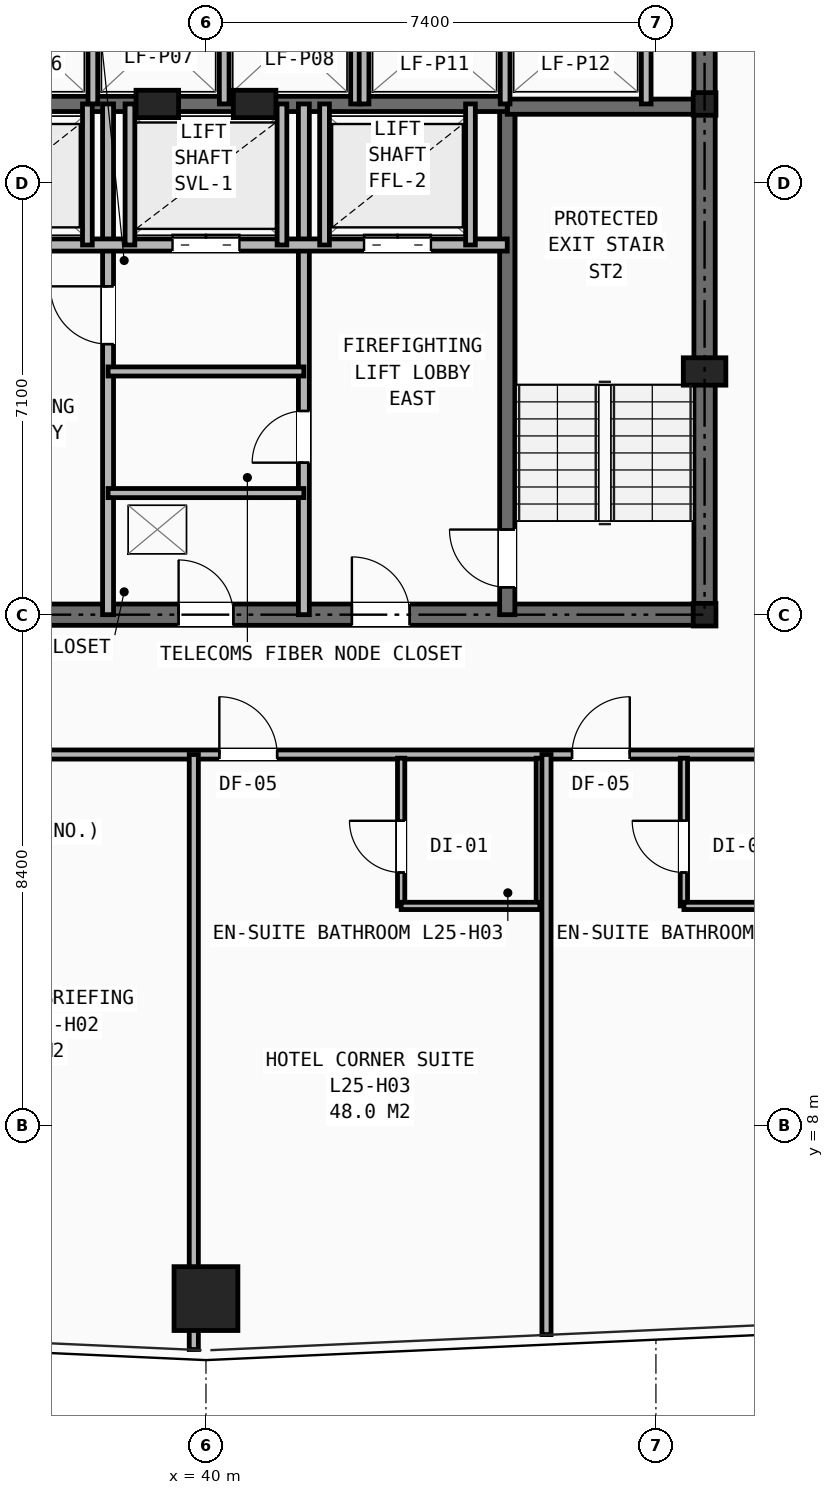
"""IFC4 building model, lengths in metres.
Left out: names, types, materials, properties, quantities, classifications, styles, units other than length and angle.
Written with IfcOpenShell. Run it as: python <this file> out.ifc"""

import sys

from ifc_helpers import new_model, si_unit, direction, frame, frame_2d, origin, origin_2d, place, context, subcontext, project, spatial, rectangle, hollow_rectangle, i_section, extrude, element, fill, save


model = new_model("IFC4")
c1 = context("Model", 3, precision=1e-05, world=origin(), true_north=direction((0.0, 1.0)))
c2 = subcontext(c1, "Body", "Model", "MODEL_VIEW")
j1 = project(units=[si_unit("LENGTHUNIT", "METRE"), si_unit("PLANEANGLEUNIT", "RADIAN")], contexts=[c1])
p1 = place(None, origin())
s1 = spatial("IfcSite", under=j1, at=p1, CompositionType="ELEMENT")
p2 = place(p1, origin())
s2 = spatial("IfcBuilding", under=s1, at=p2, CompositionType="ELEMENT")
p3 = place(p2, frame((0.0, 0.0, 89.4)))
s3 = spatial("IfcBuildingStorey", under=s2, at=p3, CompositionType="ELEMENT", Elevation=89.4)
for number, where, z_axis, x_axis in (
    (1, (48.2, 16.4, 0.0), (0.0, 0.0, 1.0), (1.0, 0.0, 0.0)),
    (2, (48.2, 24.8, 0.0), (0.0, 0.0, 1.0), (1.0, 0.0, 0.0)),
):
    element("IfcColumn", number, at=place(p3, frame(where, z_axis=z_axis, x_axis=x_axis)), inside=s3, PredefinedType="COLUMN", context=c2, shape_type="SweptSolid", body=[
        extrude(i_section(OverallWidth=0.374, OverallDepth=0.372, WebThickness=0.016, FlangeThickness=0.026, at=origin_2d()), origin(), (0.0, 0.0, 1.0), 3.2),
    ])
for number, where, z_axis, x_axis in (
    (3, (48.2, 20.4, 0.0), (0.0, 0.0, 1.0), (1.0, 0.0, 0.0)),
    (4, (39.2, 24.8, 0.0), (0.0, 0.0, 1.0), (1.0, 0.0, 0.0)),
    (5, (40.8, 24.8, 0.0), (0.0, 0.0, 1.0), (1.0, 0.0, 0.0)),
):
    element("IfcColumn", number, at=place(p3, frame(where, z_axis=z_axis, x_axis=x_axis)), inside=s3, PredefinedType="PILASTER", context=c2, shape_type="SweptSolid", body=[
        extrude(rectangle(XDim=0.7, YDim=0.45, at=origin_2d()), origin(), (0.0, 0.0, 1.0), 3.2),
    ])
p4 = place(p3, frame((40.0, 5.152, 0.0), z_axis=(0.0, 0.0, 1.0), x_axis=(1.0, 0.0, 0.0)))
e6 = element("IfcColumn", 6, at=p4, inside=s3, PredefinedType="COLUMN", context=c2, shape_type="SweptSolid", body=[
    extrude(hollow_rectangle(XDim=1.05, YDim=1.05, WallThickness=0.07, at=origin_2d()), origin(), (0.0, 0.0, 1.0), 3.2),
])
p5 = place(p3, frame((31.8, 16.4, 0.0), z_axis=(0.0, 0.0, 1.0), x_axis=(1.0, 0.0, 0.0)))
e7 = element("IfcWall", 7, at=p5, inside=s3, PredefinedType="SHEAR", context=c2, shape_type="SweptSolid", body=[
    extrude(rectangle(XDim=16.4, YDim=0.35, at=frame_2d((8.2, 0.0))), origin(), (0.0, 0.0, 1.0), 2.97),
])
p6 = place(p5, frame((7.75, 0.0, 0.0)))
e8 = element("IfcOpeningElement", 8, at=p6, cuts=e7, PredefinedType="OPENING", context=c2, shape_type="SweptSolid", body=[
    extrude(rectangle(XDim=0.9, YDim=2.1, at=frame_2d((0.45, 1.05))), frame((0.0, 0.185, 0.0), z_axis=(0.0, -1.0, 0.0), x_axis=(1.0, 0.0, 0.0)), (0.0, 0.0, 1.0), 0.37),
])
p7 = place(p5, frame((4.2, 0.0, 0.0)))
e9 = element("IfcOpeningElement", 9, at=p7, cuts=e7, PredefinedType="OPENING", context=c2, shape_type="SweptSolid", body=[
    extrude(rectangle(XDim=0.95, YDim=2.1, at=frame_2d((0.475, 1.05))), frame((0.0, 0.185, 0.0), z_axis=(0.0, -1.0, 0.0), x_axis=(1.0, 0.0, 0.0)), (0.0, 0.0, 1.0), 0.37),
])
p8 = place(p5, frame((10.6, 0.0, 0.0)))
e10 = element("IfcOpeningElement", 10, at=p8, cuts=e7, PredefinedType="OPENING", context=c2, shape_type="SweptSolid", body=[
    extrude(rectangle(XDim=0.95, YDim=2.1, at=frame_2d((0.475, 1.05))), frame((0.0, 0.185, 0.0), z_axis=(0.0, -1.0, 0.0), x_axis=(1.0, 0.0, 0.0)), (0.0, 0.0, 1.0), 0.37),
])
p9 = place(p3, frame((48.2, 16.4, 0.0), z_axis=(0.0, 0.0, 1.0), x_axis=(0.0, 1.0, 0.0)))
e11 = element("IfcWall", 11, at=p9, inside=s3, PredefinedType="SHEAR", context=c2, shape_type="SweptSolid", body=[
    extrude(rectangle(XDim=14.8, YDim=0.35, at=frame_2d((7.4, 0.0))), origin(), (0.0, 0.0, 1.0), 2.97),
])
p10 = place(p9, frame((11.0, 0.0, 0.0)))
e12 = element("IfcOpeningElement", 12, at=p10, cuts=e11, PredefinedType="OPENING", context=c2, shape_type="SweptSolid", body=[
    extrude(rectangle(XDim=1.1, YDim=2.15, at=frame_2d((0.55, 1.075))), frame((0.0, 0.185, 0.0), z_axis=(0.0, -1.0, 0.0), x_axis=(1.0, 0.0, 0.0)), (0.0, 0.0, 1.0), 0.37),
])
p11 = place(p3, frame((44.955, 16.4, 0.0), z_axis=(0.0, 0.0, 1.0), x_axis=(0.0, 1.0, 0.0)))
e13 = element("IfcWall", 13, at=p11, inside=s3, PredefinedType="SHEAR", context=c2, shape_type="SweptSolid", body=[
    extrude(rectangle(XDim=8.4, YDim=0.25, at=frame_2d((4.2, 0.0))), origin(), (0.0, 0.0, 1.0), 2.97),
])
p12 = place(p11, frame((0.45, 0.0, 0.0)))
e14 = element("IfcOpeningElement", 14, at=p12, cuts=e13, PredefinedType="OPENING", context=c2, shape_type="SweptSolid", body=[
    extrude(rectangle(XDim=0.95, YDim=2.1, at=frame_2d((0.475, 1.05))), frame((0.0, 0.135, 0.0), z_axis=(0.0, -1.0, 0.0), x_axis=(1.0, 0.0, 0.0)), (0.0, 0.0, 1.0), 0.27),
])
p13 = place(p3, frame((44.955, 24.755, 0.0), z_axis=(0.0, 0.0, 1.0), x_axis=(1.0, 0.0, 0.0)))
e15 = element("IfcWall", 15, at=p13, inside=s3, PredefinedType="SHEAR", context=c2, shape_type="SweptSolid", body=[
    extrude(rectangle(XDim=3.245, YDim=0.25, at=frame_2d((1.623, 0.0))), origin(), (0.0, 0.0, 1.0), 2.97),
])
p14 = place(p3, frame((35.045, 24.8, 0.0), z_axis=(0.0, 0.0, 1.0), x_axis=(1.0, 0.0, 0.0)))
e16 = element("IfcWall", 16, at=p14, inside=s3, PredefinedType="SHEAR", context=c2, shape_type="SweptSolid", body=[
    extrude(rectangle(XDim=9.91, YDim=0.25, at=frame_2d((4.955, 0.0))), origin(), (0.0, 0.0, 1.0), 2.97),
])
p15 = place(p3, frame((38.39, 16.4, 0.0), z_axis=(0.0, 0.0, 1.0), x_axis=(0.0, 1.0, 0.0)))
e17 = element("IfcWall", 17, at=p15, inside=s3, PredefinedType="PARTITIONING", context=c2, shape_type="SweptSolid", body=[
    extrude(rectangle(XDim=8.4, YDim=0.18, at=frame_2d((4.2, 0.0))), origin(), (0.0, 0.0, 1.0), 2.698),
])
p16 = place(p15, frame((4.45, 0.0, 0.0)))
e18 = element("IfcOpeningElement", 18, at=p16, cuts=e17, PredefinedType="OPENING", context=c2, shape_type="SweptSolid", body=[
    extrude(rectangle(XDim=0.95, YDim=2.1, at=frame_2d((0.475, 1.05))), frame((0.0, 0.1, 0.0), z_axis=(0.0, -1.0, 0.0), x_axis=(1.0, 0.0, 0.0)), (0.0, 0.0, 1.0), 0.2),
])
p17 = place(p3, frame((41.61, 16.4, 0.0), z_axis=(0.0, 0.0, 1.0), x_axis=(0.0, 1.0, 0.0)))
e19 = element("IfcWall", 19, at=p17, inside=s3, PredefinedType="PARTITIONING", context=c2, shape_type="SweptSolid", body=[
    extrude(rectangle(XDim=8.4, YDim=0.18, at=frame_2d((4.2, 0.0))), origin(), (0.0, 0.0, 1.0), 2.698),
])
p18 = place(p17, frame((2.5, 0.0, 0.0)))
e20 = element("IfcOpeningElement", 20, at=p18, cuts=e19, PredefinedType="OPENING", context=c2, shape_type="SweptSolid", body=[
    extrude(rectangle(XDim=0.85, YDim=2.05, at=frame_2d((0.425, 1.025))), frame((0.0, 0.1, 0.0), z_axis=(0.0, -1.0, 0.0), x_axis=(1.0, 0.0, 0.0)), (0.0, 0.0, 1.0), 0.2),
])
p19 = place(p3, frame((35.045, 22.48, 0.0), z_axis=(0.0, 0.0, 1.0), x_axis=(1.0, 0.0, 0.0)))
e21 = element("IfcWall", 21, at=p19, inside=s3, PredefinedType="SOLIDWALL", context=c2, shape_type="SweptSolid", body=[
    extrude(rectangle(XDim=9.91, YDim=0.2, at=frame_2d((4.955, 0.0))), origin(), (0.0, 0.0, 1.0), 2.97),
])
p20 = place(p19, frame((1.255, 0.0, 0.0)))
e22 = element("IfcOpeningElement", 22, at=p20, cuts=e21, PredefinedType="OPENING", context=c2, shape_type="SweptSolid", body=[
    extrude(rectangle(XDim=1.1, YDim=2.15, at=frame_2d((0.55, 1.075))), frame((0.0, 0.11, 0.0), z_axis=(0.0, -1.0, 0.0), x_axis=(1.0, 0.0, 0.0)), (0.0, 0.0, 1.0), 0.22),
])
p21 = place(p19, frame((7.555, 0.0, 0.0)))
e23 = element("IfcOpeningElement", 23, at=p21, cuts=e21, PredefinedType="OPENING", context=c2, shape_type="SweptSolid", body=[
    extrude(rectangle(XDim=1.1, YDim=2.15, at=frame_2d((0.55, 1.075))), frame((0.0, 0.11, 0.0), z_axis=(0.0, -1.0, 0.0), x_axis=(1.0, 0.0, 0.0)), (0.0, 0.0, 1.0), 0.22),
])
p22 = place(p19, frame((4.405, 0.0, 0.0)))
e24 = element("IfcOpeningElement", 24, at=p22, cuts=e21, PredefinedType="OPENING", context=c2, shape_type="SweptSolid", body=[
    extrude(rectangle(XDim=1.1, YDim=2.15, at=frame_2d((0.55, 1.075))), frame((0.0, 0.11, 0.0), z_axis=(0.0, -1.0, 0.0), x_axis=(1.0, 0.0, 0.0)), (0.0, 0.0, 1.0), 0.22),
])
for number, where, z_axis, x_axis in (
    (25, (38.39, 18.4, 0.0), (0.0, 0.0, 1.0), (1.0, 0.0, 0.0)),
    (26, (38.39, 20.4, 0.0), (0.0, 0.0, 1.0), (1.0, 0.0, 0.0)),
):
    element("IfcWall", number, at=place(p3, frame(where, z_axis=z_axis, x_axis=x_axis)), inside=s3, PredefinedType="PARTITIONING", context=c2, shape_type="SweptSolid", body=[
        extrude(rectangle(XDim=3.22, YDim=0.15, at=frame_2d((1.61, 0.0))), origin(), (0.0, 0.0, 1.0), 2.97),
    ])
for number, where, z_axis, x_axis in (
    (27, (38.05, 22.48, 0.0), (0.0, 0.0, 1.0), (0.0, 1.0, 0.0)),
    (28, (41.95, 22.48, 0.0), (0.0, 0.0, 1.0), (0.0, 1.0, 0.0)),
    (29, (44.35, 22.48, 0.0), (0.0, 0.0, 1.0), (0.0, 1.0, 0.0)),
    (30, (38.75, 22.48, 0.0), (0.0, 0.0, 1.0), (0.0, 1.0, 0.0)),
    (31, (41.25, 22.48, 0.0), (0.0, 0.0, 1.0), (0.0, 1.0, 0.0)),
):
    element("IfcWall", number, at=place(p3, frame(where, z_axis=z_axis, x_axis=x_axis)), inside=s3, PredefinedType="SOLIDWALL", context=c2, shape_type="SweptSolid", body=[
        extrude(rectangle(XDim=2.32, YDim=0.16, at=frame_2d((1.16, 0.0))), origin(), (0.0, 0.0, 1.0), 2.97),
    ])
for number, where, z_axis, x_axis in (
    (32, (38.14, 24.8, 0.0), (0.0, 0.0, 1.0), (0.0, 1.0, 0.0)),
    (33, (40.3, 24.8, 0.0), (0.0, 0.0, 1.0), (0.0, 1.0, 0.0)),
    (34, (42.46, 24.8, 0.0), (0.0, 0.0, 1.0), (0.0, 1.0, 0.0)),
    (35, (42.6, 24.8, 0.0), (0.0, 0.0, 1.0), (0.0, 1.0, 0.0)),
    (36, (44.92, 24.8, 0.0), (0.0, 0.0, 1.0), (0.0, 1.0, 0.0)),
    (37, (47.24, 24.8, 0.0), (0.0, 0.0, 1.0), (0.0, 1.0, 0.0)),
):
    element("IfcWall", number, at=place(p3, frame(where, z_axis=z_axis, x_axis=x_axis)), inside=s3, PredefinedType="SOLIDWALL", context=c2, shape_type="SweptSolid", body=[
        extrude(rectangle(XDim=2.08, YDim=0.16, at=frame_2d((1.04, 0.0))), origin(), (0.0, 0.0, 1.0), 2.97),
    ])
p23 = place(p3, frame((29.6, 14.1, 0.0), z_axis=(0.0, 0.0, 1.0), x_axis=(1.0, 0.0, 0.0)))
e38 = element("IfcWall", 38, at=p23, inside=s3, PredefinedType="PARTITIONING", context=c2, shape_type="SweptSolid", body=[
    extrude(rectangle(XDim=20.8, YDim=0.15, at=frame_2d((10.4, 0.0))), origin(), (0.0, 0.0, 1.0), 2.181),
])
p24 = place(p23, frame((0.57, 0.0, 0.0)))
e39 = element("IfcOpeningElement", 39, at=p24, cuts=e38, PredefinedType="OPENING", context=c2, shape_type="SweptSolid", body=[
    extrude(rectangle(XDim=0.95, YDim=2.1, at=frame_2d((0.475, 1.05))), frame((0.0, 0.085, 0.0), z_axis=(0.0, -1.0, 0.0), x_axis=(1.0, 0.0, 0.0)), (0.0, 0.0, 1.0), 0.17),
])
p25 = place(p23, frame((5.02, 0.0, 0.0)))
e40 = element("IfcOpeningElement", 40, at=p25, cuts=e38, PredefinedType="OPENING", context=c2, shape_type="SweptSolid", body=[
    extrude(rectangle(XDim=0.95, YDim=2.1, at=frame_2d((0.475, 1.05))), frame((0.0, 0.085, 0.0), z_axis=(0.0, -1.0, 0.0), x_axis=(1.0, 0.0, 0.0)), (0.0, 0.0, 1.0), 0.17),
])
p26 = place(p23, frame((10.62, 0.0, 0.0)))
e41 = element("IfcOpeningElement", 41, at=p26, cuts=e38, PredefinedType="OPENING", context=c2, shape_type="SweptSolid", body=[
    extrude(rectangle(XDim=0.95, YDim=2.1, at=frame_2d((0.475, 1.05))), frame((0.0, 0.085, 0.0), z_axis=(0.0, -1.0, 0.0), x_axis=(1.0, 0.0, 0.0)), (0.0, 0.0, 1.0), 0.17),
])
p27 = place(p23, frame((16.42, 0.0, 0.0)))
e42 = element("IfcOpeningElement", 42, at=p27, cuts=e38, PredefinedType="OPENING", context=c2, shape_type="SweptSolid", body=[
    extrude(rectangle(XDim=0.95, YDim=2.1, at=frame_2d((0.475, 1.05))), frame((0.0, 0.085, 0.0), z_axis=(0.0, -1.0, 0.0), x_axis=(1.0, 0.0, 0.0)), (0.0, 0.0, 1.0), 0.17),
])
p28 = place(p3, frame((39.8, 4.314, 0.0), z_axis=(0.0, 0.0, 1.0), x_axis=(0.0, 1.0, 0.0)))
e43 = element("IfcWall", 43, at=p28, inside=s3, PredefinedType="PARTITIONING", context=c2, shape_type="SweptSolid", body=[
    extrude(rectangle(XDim=9.786, YDim=0.15, at=frame_2d((4.893, 0.0))), origin(), (0.0, 0.0, 1.0), 2.181),
])
p29 = place(p3, frame((43.21, 11.61, 0.0), z_axis=(0.0, 0.0, 1.0), x_axis=(0.0, 1.0, 0.0)))
e44 = element("IfcWall", 44, at=p29, inside=s3, PredefinedType="PARTITIONING", context=c2, shape_type="SweptSolid", body=[
    extrude(rectangle(XDim=2.43, YDim=0.12, at=frame_2d((1.215, 0.0))), origin(), (0.0, 0.0, 1.0), 2.97),
])
p30 = place(p29, frame((0.55, 0.0, 0.0)))
e45 = element("IfcOpeningElement", 45, at=p30, cuts=e44, PredefinedType="OPENING", context=c2, shape_type="SweptSolid", body=[
    extrude(rectangle(XDim=0.85, YDim=2.05, at=frame_2d((0.425, 1.025))), frame((0.0, 0.07, 0.0), z_axis=(0.0, -1.0, 0.0), x_axis=(1.0, 0.0, 0.0)), (0.0, 0.0, 1.0), 0.14),
])
p31 = place(p3, frame((45.49, 11.61, 0.0), z_axis=(0.0, 0.0, 1.0), x_axis=(0.0, 1.0, 0.0)))
e46 = element("IfcWall", 46, at=p31, inside=s3, PredefinedType="PARTITIONING", context=c2, shape_type="SweptSolid", body=[
    extrude(rectangle(XDim=2.43, YDim=0.12, at=frame_2d((1.215, 0.0))), origin(), (0.0, 0.0, 1.0), 2.97),
])
p32 = place(p3, frame((43.21, 11.61, 0.0), z_axis=(0.0, 0.0, 1.0), x_axis=(1.0, 0.0, 0.0)))
e47 = element("IfcWall", 47, at=p32, inside=s3, PredefinedType="PARTITIONING", context=c2, shape_type="SweptSolid", body=[
    extrude(rectangle(XDim=2.28, YDim=0.12, at=frame_2d((1.14, 0.0))), origin(), (0.0, 0.0, 1.0), 2.97),
])
p33 = place(p3, frame((45.6, 4.559, 0.0), z_axis=(0.0, 0.0, 1.0), x_axis=(0.0, 1.0, 0.0)))
e48 = element("IfcWall", 48, at=p33, inside=s3, PredefinedType="PARTITIONING", context=c2, shape_type="SweptSolid", body=[
    extrude(rectangle(XDim=9.541, YDim=0.15, at=frame_2d((4.771, 0.0))), origin(), (0.0, 0.0, 1.0), 2.258),
])
p34 = place(p3, frame((47.86, 11.61, 0.0), z_axis=(0.0, 0.0, 1.0), x_axis=(0.0, 1.0, 0.0)))
e49 = element("IfcWall", 49, at=p34, inside=s3, PredefinedType="PARTITIONING", context=c2, shape_type="SweptSolid", body=[
    extrude(rectangle(XDim=2.43, YDim=0.12, at=frame_2d((1.215, 0.0))), origin(), (0.0, 0.0, 1.0), 2.97),
])
p35 = place(p34, frame((0.55, 0.0, 0.0)))
e50 = element("IfcOpeningElement", 50, at=p35, cuts=e49, PredefinedType="OPENING", context=c2, shape_type="SweptSolid", body=[
    extrude(rectangle(XDim=0.85, YDim=2.05, at=frame_2d((0.425, 1.025))), frame((0.0, 0.07, 0.0), z_axis=(0.0, -1.0, 0.0), x_axis=(1.0, 0.0, 0.0)), (0.0, 0.0, 1.0), 0.14),
])
p36 = place(p3, frame((47.86, 11.61, 0.0), z_axis=(0.0, 0.0, 1.0), x_axis=(1.0, 0.0, 0.0)))
e51 = element("IfcWall", 51, at=p36, inside=s3, PredefinedType="PARTITIONING", context=c2, shape_type="SweptSolid", body=[
    extrude(rectangle(XDim=2.28, YDim=0.12, at=frame_2d((1.14, 0.0))), origin(), (0.0, 0.0, 1.0), 2.97),
])
p37 = place(p6, origin())
e52 = element("IfcDoor", 52, at=p37, inside=s3, OperationType="SINGLE_SWING_LEFT", PredefinedType="DOOR", context=c2, shape_type="SweptSolid", body=[
    extrude(rectangle(XDim=0.9, YDim=2.1, at=frame_2d((0.45, 1.05))), frame((0.0, 0.025, 0.0), z_axis=(0.0, -1.0, 0.0), x_axis=(1.0, 0.0, 0.0)), (0.0, 0.0, 1.0), 0.05),
])
fill(e8, e52)
p38 = place(p18, origin())
e53 = element("IfcDoor", 53, at=p38, inside=s3, OperationType="SINGLE_SWING_LEFT", PredefinedType="DOOR", context=c2, shape_type="SweptSolid", body=[
    extrude(rectangle(XDim=0.85, YDim=2.05, at=frame_2d((0.425, 1.025))), frame((0.0, 0.025, 0.0), z_axis=(0.0, -1.0, 0.0), x_axis=(1.0, 0.0, 0.0)), (0.0, 0.0, 1.0), 0.05),
])
fill(e20, e53)
p39 = place(p16, origin())
e54 = element("IfcDoor", 54, at=p39, inside=s3, OperationType="SINGLE_SWING_RIGHT", PredefinedType="DOOR", context=c2, shape_type="SweptSolid", body=[
    extrude(rectangle(XDim=0.95, YDim=2.1, at=frame_2d((0.475, 1.05))), frame((0.0, 0.025, 0.0), z_axis=(0.0, -1.0, 0.0), x_axis=(1.0, 0.0, 0.0)), (0.0, 0.0, 1.0), 0.05),
])
fill(e18, e54)
p40 = place(p12, origin())
e55 = element("IfcDoor", 55, at=p40, inside=s3, OperationType="SINGLE_SWING_RIGHT", PredefinedType="DOOR", context=c2, shape_type="SweptSolid", body=[
    extrude(rectangle(XDim=0.95, YDim=2.1, at=frame_2d((0.475, 1.05))), frame((0.0, 0.025, 0.0), z_axis=(0.0, -1.0, 0.0), x_axis=(1.0, 0.0, 0.0)), (0.0, 0.0, 1.0), 0.05),
])
fill(e14, e55)
p41 = place(p8, origin())
e56 = element("IfcDoor", 56, at=p41, inside=s3, OperationType="SINGLE_SWING_LEFT", PredefinedType="DOOR", context=c2, shape_type="SweptSolid", body=[
    extrude(rectangle(XDim=0.95, YDim=2.1, at=frame_2d((0.475, 1.05))), frame((0.0, 0.025, 0.0), z_axis=(0.0, -1.0, 0.0), x_axis=(1.0, 0.0, 0.0)), (0.0, 0.0, 1.0), 0.05),
])
fill(e10, e56)
p42 = place(p21, origin())
e57 = element("IfcDoor", 57, at=p42, inside=s3, OperationType="DOUBLE_DOOR_SLIDING", PredefinedType="DOOR", context=c2, shape_type="SweptSolid", body=[
    extrude(rectangle(XDim=1.1, YDim=2.15, at=frame_2d((0.55, 1.075))), frame((0.0, 0.025, 0.0), z_axis=(0.0, -1.0, 0.0), x_axis=(1.0, 0.0, 0.0)), (0.0, 0.0, 1.0), 0.05),
])
fill(e23, e57)
p43 = place(p22, origin())
e58 = element("IfcDoor", 58, at=p43, inside=s3, OperationType="DOUBLE_DOOR_SLIDING", PredefinedType="DOOR", context=c2, shape_type="SweptSolid", body=[
    extrude(rectangle(XDim=1.1, YDim=2.15, at=frame_2d((0.55, 1.075))), frame((0.0, 0.025, 0.0), z_axis=(0.0, -1.0, 0.0), x_axis=(1.0, 0.0, 0.0)), (0.0, 0.0, 1.0), 0.05),
])
fill(e24, e58)
p44 = place(p26, origin())
e59 = element("IfcDoor", 59, at=p44, inside=s3, OperationType="SINGLE_SWING_LEFT", PredefinedType="DOOR", context=c2, shape_type="SweptSolid", body=[
    extrude(rectangle(XDim=0.95, YDim=2.1, at=frame_2d((0.475, 1.05))), frame((0.0, 0.025, 0.0), z_axis=(0.0, -1.0, 0.0), x_axis=(1.0, 0.0, 0.0)), (0.0, 0.0, 1.0), 0.05),
])
fill(e41, e59)
p45 = place(p30, origin())
e60 = element("IfcDoor", 60, at=p45, inside=s3, OperationType="SINGLE_SWING_RIGHT", PredefinedType="DOOR", context=c2, shape_type="SweptSolid", body=[
    extrude(rectangle(XDim=0.85, YDim=2.05, at=frame_2d((0.425, 1.025))), frame((0.0, 0.025, 0.0), z_axis=(0.0, -1.0, 0.0), x_axis=(1.0, 0.0, 0.0)), (0.0, 0.0, 1.0), 0.05),
])
fill(e45, e60)
p46 = place(p27, origin())
e61 = element("IfcDoor", 61, at=p46, inside=s3, OperationType="SINGLE_SWING_RIGHT", PredefinedType="DOOR", context=c2, shape_type="SweptSolid", body=[
    extrude(rectangle(XDim=0.95, YDim=2.1, at=frame_2d((0.475, 1.05))), frame((0.0, 0.025, 0.0), z_axis=(0.0, -1.0, 0.0), x_axis=(1.0, 0.0, 0.0)), (0.0, 0.0, 1.0), 0.05),
])
fill(e42, e61)
p47 = place(p35, origin())
e62 = element("IfcDoor", 62, at=p47, inside=s3, OperationType="SINGLE_SWING_RIGHT", PredefinedType="DOOR", context=c2, shape_type="SweptSolid", body=[
    extrude(rectangle(XDim=0.85, YDim=2.05, at=frame_2d((0.425, 1.025))), frame((0.0, 0.025, 0.0), z_axis=(0.0, -1.0, 0.0), x_axis=(1.0, 0.0, 0.0)), (0.0, 0.0, 1.0), 0.05),
])
fill(e50, e62)
save(model, sys.argv[1])
